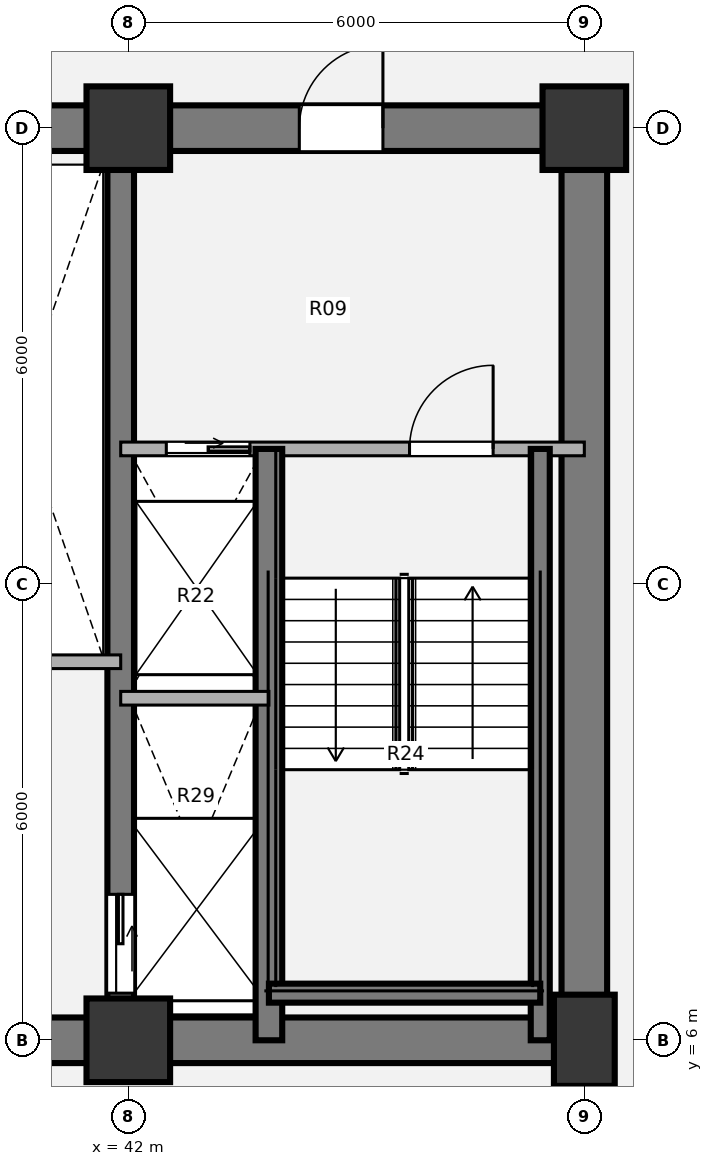
"""IFC4 building model, lengths in metres.
Left out: names, types, materials, properties, quantities, classifications, styles, units other than length and angle.
Written with IfcOpenShell. Run it as: python <this file> out.ifc"""

import sys

from ifc_helpers import new_model, si_unit, direction, frame, frame_2d, origin, origin_2d, place, context, subcontext, project, spatial, rectangle, extrude, source, transform, mapped, element, fill, save


model = new_model("IFC4")
c1 = context("Model", 3, precision=1e-05, world=origin(), true_north=direction((0.0, 1.0)))
c2 = subcontext(c1, "Body", "Model", "MODEL_VIEW")
j1 = project(units=[si_unit("LENGTHUNIT", "METRE"), si_unit("PLANEANGLEUNIT", "RADIAN")], contexts=[c1])
p1 = place(None, origin())
s1 = spatial("IfcSite", under=j1, at=p1, CompositionType="ELEMENT")
p2 = place(p1, origin())
s2 = spatial("IfcBuilding", under=s1, at=p2, CompositionType="ELEMENT")
p3 = place(p2, frame((0.0, 0.0, 53.46)))
s3 = spatial("IfcBuildingStorey", under=s2, at=p3, CompositionType="ELEMENT", Elevation=53.46)
m1 = source(origin(), c2, "Body", "SweptSolid", [
    extrude(rectangle(XDim=1.1, YDim=1.1, at=origin_2d()), origin(), (0.0, 0.0, 1.0), 3.78),
])
p4 = place(p3, frame((42.0, 6.0, 0.0), z_axis=(0.0, 0.0, 1.0), x_axis=(1.0, 0.0, 0.0)))
e1 = element("IfcColumn", 1, at=p4, inside=s3, PredefinedType="COLUMN", context=c2, shape_type="MappedRepresentation", body=[
    mapped(m1, transform((0.0, 0.0, 0.0), x_axis=(1.0, 0.0, 0.0), y_axis=(0.0, 1.0, 0.0), z_axis=(0.0, 0.0, 1.0), scale=1.0)),
])
m2 = source(origin(), c2, "Body", "SweptSolid", [
    extrude(rectangle(XDim=0.8, YDim=1.2, at=origin_2d()), origin(), (0.0, 0.0, 1.0), 3.78),
])
p5 = place(p3, frame((48.0, 6.0, 0.0), z_axis=(0.0, 0.0, 1.0), x_axis=(1.0, 0.0, 0.0)))
e2 = element("IfcColumn", 2, at=p5, inside=s3, PredefinedType="COLUMN", context=c2, shape_type="MappedRepresentation", body=[
    mapped(m2, transform((0.0, 0.0, 0.0), x_axis=(1.0, 0.0, 0.0), y_axis=(0.0, 1.0, 0.0), z_axis=(0.0, 0.0, 1.0), scale=1.0)),
])
for number, where, z_axis, x_axis in (
    (3, (42.0, 18.0, 0.0), (0.0, 0.0, 1.0), (1.0, 0.0, 0.0)),
    (4, (48.0, 18.0, 0.0), (0.0, 0.0, 1.0), (1.0, 0.0, 0.0)),
):
    element("IfcColumn", number, at=place(p3, frame(where, z_axis=z_axis, x_axis=x_axis)), inside=s3, PredefinedType="COLUMN", context=c2, shape_type="MappedRepresentation", body=[
        mapped(m1, transform((0.0, 0.0, 0.0), x_axis=(1.0, 0.0, 0.0), y_axis=(0.0, 1.0, 0.0), z_axis=(0.0, 0.0, 1.0), scale=1.0)),
    ])
p6 = place(p3, frame((48.3, 6.0, 0.0), z_axis=(0.0, 0.0, 1.0), x_axis=(-1.0, 0.0, 0.0)))
e5 = element("IfcWall", 5, at=p6, inside=s3, PredefinedType="SHEAR", context=c2, shape_type="SweptSolid", body=[
    extrude(rectangle(XDim=24.6, YDim=0.6, at=frame_2d((12.3, 0.0))), origin(), (0.0, 0.0, 1.0), 3.78),
])
p7 = place(p3, frame((48.0, 18.0, 0.0), z_axis=(0.0, 0.0, 1.0), x_axis=(0.0, -1.0, 0.0)))
e6 = element("IfcWall", 6, at=p7, inside=s3, PredefinedType="SHEAR", context=c2, shape_type="SweptSolid", body=[
    extrude(rectangle(XDim=12.0, YDim=0.6, at=frame_2d((6.0, 0.0))), origin(), (0.0, 0.0, 1.0), 3.78),
])
p8 = place(p3, frame((38.8, 18.0, 0.0), z_axis=(0.0, 0.0, 1.0), x_axis=(1.0, 0.0, 0.0)))
e7 = element("IfcWall", 7, at=p8, inside=s3, PredefinedType="SHEAR", context=c2, shape_type="SweptSolid", body=[
    extrude(rectangle(XDim=9.5, YDim=0.6, at=frame_2d((4.75, 0.0))), origin(), (0.0, 0.0, 1.0), 3.78),
])
p9 = place(p8, frame((5.45, 0.0, 0.0)))
e8 = element("IfcOpeningElement", 8, at=p9, cuts=e7, PredefinedType="OPENING", context=c2, shape_type="SweptSolid", body=[
    extrude(rectangle(XDim=1.1, YDim=2.1, at=origin_2d()), frame((0.55, 0.31, 1.05), z_axis=(0.0, -1.0, 0.0), x_axis=(1.0, 0.0, 0.0)), (0.0, 0.0, 1.0), 0.62),
])
p10 = place(p3, frame((41.9, 18.0, 0.0), z_axis=(0.0, 0.0, 1.0), x_axis=(0.0, -1.0, 0.0)))
e9 = element("IfcWall", 9, at=p10, inside=s3, PredefinedType="SHEAR", context=c2, shape_type="SweptSolid", body=[
    extrude(rectangle(XDim=12.0, YDim=0.35, at=frame_2d((6.0, 0.0))), origin(), (0.0, 0.0, 1.0), 3.78),
])
p11 = place(p10, frame((10.08, 0.0, 0.0)))
e10 = element("IfcOpeningElement", 10, at=p11, cuts=e9, PredefinedType="OPENING", context=c2, shape_type="SweptSolid", body=[
    extrude(rectangle(XDim=1.3, YDim=2.1, at=origin_2d()), frame((0.65, 0.185, 1.05), z_axis=(0.0, -1.0, 0.0), x_axis=(1.0, 0.0, 0.0)), (0.0, 0.0, 1.0), 0.37),
])
p12 = place(p3, frame((39.35, 10.98, 0.0), z_axis=(0.0, 0.0, 1.0), x_axis=(1.0, 0.0, 0.0)))
e11 = element("IfcWall", 11, at=p12, inside=s3, PredefinedType="PARTITIONING", context=c2, shape_type="SweptSolid", body=[
    extrude(rectangle(XDim=2.55, YDim=0.18, at=frame_2d((1.275, 0.0))), origin(), (0.0, 0.0, 1.0), 3.5),
])
p13 = place(p3, frame((41.9, 13.78, 0.0), z_axis=(0.0, 0.0, 1.0), x_axis=(1.0, 0.0, 0.0)))
e12 = element("IfcWall", 12, at=p13, inside=s3, PredefinedType="PARTITIONING", context=c2, shape_type="SweptSolid", body=[
    extrude(rectangle(XDim=6.1, YDim=0.18, at=frame_2d((3.05, 0.0))), origin(), (0.0, 0.0, 1.0), 3.5),
])
p14 = place(p13, frame((0.6, 0.0, 0.0)))
e13 = element("IfcOpeningElement", 13, at=p14, cuts=e12, PredefinedType="OPENING", context=c2, shape_type="SweptSolid", body=[
    extrude(rectangle(XDim=1.1, YDim=2.1, at=origin_2d()), frame((0.55, 0.1, 1.05), z_axis=(0.0, -1.0, 0.0), x_axis=(1.0, 0.0, 0.0)), (0.0, 0.0, 1.0), 0.2),
])
p15 = place(p13, frame((3.8, 0.0, 0.0)))
e14 = element("IfcOpeningElement", 14, at=p15, cuts=e12, PredefinedType="OPENING", context=c2, shape_type="SweptSolid", body=[
    extrude(rectangle(XDim=1.1, YDim=2.1, at=origin_2d()), frame((0.55, 0.1, 1.05), z_axis=(0.0, -1.0, 0.0), x_axis=(1.0, 0.0, 0.0)), (0.0, 0.0, 1.0), 0.2),
])
p16 = place(p3, frame((43.85, 6.0, 0.0), z_axis=(0.0, 0.0, 1.0), x_axis=(0.0, 1.0, 0.0)))
e15 = element("IfcWall", 15, at=p16, inside=s3, PredefinedType="SHEAR", context=c2, shape_type="SweptSolid", body=[
    extrude(rectangle(XDim=7.78, YDim=0.35, at=frame_2d((3.89, 0.0))), origin(), (0.0, 0.0, 1.0), 3.85),
])
p17 = place(p3, frame((47.42, 6.0, 0.0), z_axis=(0.0, 0.0, 1.0), x_axis=(0.0, 1.0, 0.0)))
e16 = element("IfcWall", 16, at=p17, inside=s3, PredefinedType="SHEAR", context=c2, shape_type="SweptSolid", body=[
    extrude(rectangle(XDim=7.78, YDim=0.25, at=frame_2d((3.89, 0.0))), origin(), (0.0, 0.0, 1.0), 3.85),
])
p18 = place(p3, frame((43.85, 6.62, 0.0), z_axis=(0.0, 0.0, 1.0), x_axis=(1.0, 0.0, 0.0)))
e17 = element("IfcWall", 17, at=p18, inside=s3, PredefinedType="SHEAR", context=c2, shape_type="SweptSolid", body=[
    extrude(rectangle(XDim=3.57, YDim=0.25, at=frame_2d((1.785, 0.0))), origin(), (0.0, 0.0, 1.0), 3.85),
])
p19 = place(p3, frame((41.9, 10.5, 0.0), z_axis=(0.0, 0.0, 1.0), x_axis=(1.0, 0.0, 0.0)))
e18 = element("IfcWall", 18, at=p19, inside=s3, PredefinedType="PARTITIONING", context=c2, shape_type="SweptSolid", body=[
    extrude(rectangle(XDim=1.95, YDim=0.18, at=frame_2d((0.975, 0.0))), origin(), (0.0, 0.0, 1.0), 3.5),
])
m3 = source(origin(), c2, "Body", "SweptSolid", [
    extrude(rectangle(XDim=1.1, YDim=2.1, at=origin_2d()), frame((0.55, 0.025, 1.05), z_axis=(0.0, -1.0, 0.0), x_axis=(1.0, 0.0, 0.0)), (0.0, 0.0, 1.0), 0.05),
])
p20 = place(p14, origin())
e19 = element("IfcDoor", 19, at=p20, inside=s3, OperationType="SLIDING_TO_RIGHT", PredefinedType="DOOR", context=c2, shape_type="MappedRepresentation", body=[
    mapped(m3, transform((0.0, 0.0, 0.0), x_axis=(1.0, 0.0, 0.0), y_axis=(0.0, 1.0, 0.0), z_axis=(0.0, 0.0, 1.0), scale=1.0)),
])
fill(e13, e19)
m4 = source(origin(), c2, "Body", "SweptSolid", [
    extrude(rectangle(XDim=1.1, YDim=2.1, at=origin_2d()), frame((0.55, 0.025, 1.05), z_axis=(0.0, -1.0, 0.0), x_axis=(1.0, 0.0, 0.0)), (0.0, 0.0, 1.0), 0.05),
])
p21 = place(p15, origin())
e20 = element("IfcDoor", 20, at=p21, inside=s3, OperationType="SINGLE_SWING_RIGHT", PredefinedType="DOOR", context=c2, shape_type="MappedRepresentation", body=[
    mapped(m4, transform((0.0, 0.0, 0.0), x_axis=(1.0, 0.0, 0.0), y_axis=(0.0, 1.0, 0.0), z_axis=(0.0, 0.0, 1.0), scale=1.0)),
])
fill(e14, e20)
m5 = source(origin(), c2, "Body", "SweptSolid", [
    extrude(rectangle(XDim=1.3, YDim=2.1, at=origin_2d()), frame((0.65, 0.025, 1.05), z_axis=(0.0, -1.0, 0.0), x_axis=(1.0, 0.0, 0.0)), (0.0, 0.0, 1.0), 0.05),
])
p22 = place(p11, origin())
e21 = element("IfcDoor", 21, at=p22, inside=s3, OperationType="SLIDING_TO_LEFT", PredefinedType="DOOR", context=c2, shape_type="MappedRepresentation", body=[
    mapped(m5, transform((0.0, 0.0, 0.0), x_axis=(1.0, 0.0, 0.0), y_axis=(0.0, 1.0, 0.0), z_axis=(0.0, 0.0, 1.0), scale=1.0)),
])
fill(e10, e21)
m6 = source(origin(), c2, "Body", "SweptSolid", [
    extrude(rectangle(XDim=1.1, YDim=2.1, at=origin_2d()), frame((0.55, 0.025, 1.05), z_axis=(0.0, -1.0, 0.0), x_axis=(1.0, 0.0, 0.0)), (0.0, 0.0, 1.0), 0.05),
])
p23 = place(p9, origin())
e22 = element("IfcDoor", 22, at=p23, inside=s3, OperationType="SINGLE_SWING_RIGHT", PredefinedType="DOOR", context=c2, shape_type="MappedRepresentation", body=[
    mapped(m6, transform((0.0, 0.0, 0.0), x_axis=(1.0, 0.0, 0.0), y_axis=(0.0, 1.0, 0.0), z_axis=(0.0, 0.0, 1.0), scale=1.0)),
])
fill(e8, e22)
save(model, sys.argv[1])
